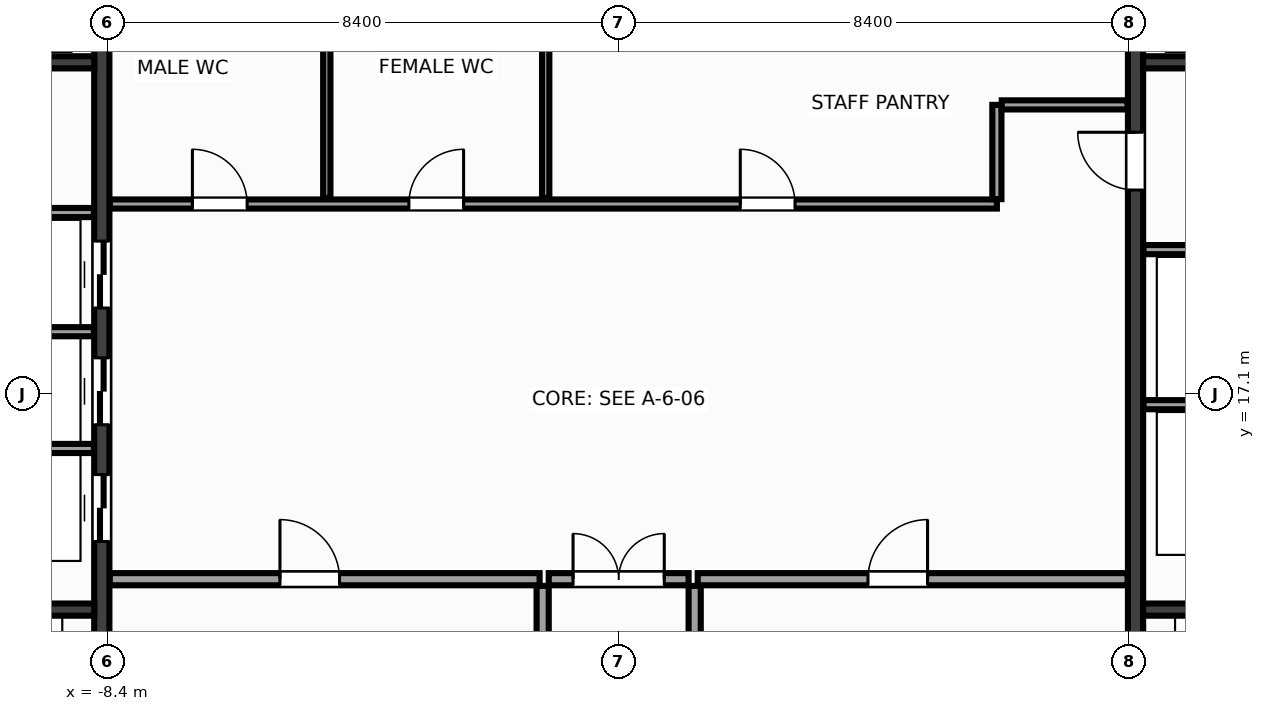
"""IFC4 building model, lengths in metres.
Left out: names, types, materials, properties, quantities, classifications, styles, units other than length and angle.
Written with IfcOpenShell. Run it as: python <this file> out.ifc"""

import sys

from ifc_helpers import new_model, si_unit, direction, frame, frame_2d, origin, place, context, subcontext, project, spatial, rectangle, extrude, source, transform, mapped, element, fill, save


model = new_model("IFC4")
c1 = context("Model", 3, precision=1e-05, world=origin(), true_north=direction((0.0, 1.0)))
c2 = subcontext(c1, "Body", "Model", "MODEL_VIEW")
j1 = project(units=[si_unit("LENGTHUNIT", "METRE"), si_unit("PLANEANGLEUNIT", "RADIAN")], contexts=[c1])
p1 = place(None, origin())
s1 = spatial("IfcSite", under=j1, at=p1, CompositionType="ELEMENT")
p2 = place(p1, origin())
s2 = spatial("IfcBuilding", under=s1, at=p2, CompositionType="ELEMENT")
p3 = place(p2, frame((0.0, 0.0, 228.8)))
s3 = spatial("IfcBuildingStorey", under=s2, at=p3, CompositionType="ELEMENT", Elevation=228.8)
m1 = source(origin(), c2, "Body", "SweptSolid", [
    extrude(rectangle(XDim=13.1, YDim=0.25, at=frame_2d((6.55, 0.0))), origin(), (0.0, 0.0, 1.0), 3.6),
])
p4 = place(p3, frame((-8.5, 10.45, 0.0), z_axis=(0.0, 0.0, 1.0), x_axis=(0.0, 1.0, 0.0)))
e1 = element("IfcWall", 1, at=p4, inside=s3, PredefinedType="SHEAR", context=c2, shape_type="MappedRepresentation", body=[
    mapped(m1, transform((0.0, 0.0, 0.0), x_axis=(1.0, 0.0, 0.0), y_axis=(0.0, 1.0, 0.0), z_axis=(0.0, 0.0, 1.0), scale=1.0)),
])
p5 = place(p4, frame((4.22, 0.0, 0.0)))
e2 = element("IfcOpeningElement", 2, at=p5, cuts=e1, PredefinedType="OPENING", context=c2, shape_type="SweptSolid", body=[
    extrude(rectangle(XDim=1.1, YDim=2.15, at=frame_2d((0.55, 1.075))), frame((0.0, 0.137, 0.0), z_axis=(0.0, -1.0, 0.0), x_axis=(1.0, 0.0, 0.0)), (0.0, 0.0, 1.0), 0.274),
])
p6 = place(p4, frame((6.14, 0.0, 0.0)))
e3 = element("IfcOpeningElement", 3, at=p6, cuts=e1, PredefinedType="OPENING", context=c2, shape_type="SweptSolid", body=[
    extrude(rectangle(XDim=1.1, YDim=2.15, at=frame_2d((0.55, 1.075))), frame((0.0, 0.137, 0.0), z_axis=(0.0, -1.0, 0.0), x_axis=(1.0, 0.0, 0.0)), (0.0, 0.0, 1.0), 0.274),
])
p7 = place(p4, frame((8.06, 0.0, 0.0)))
e4 = element("IfcOpeningElement", 4, at=p7, cuts=e1, PredefinedType="OPENING", context=c2, shape_type="SweptSolid", body=[
    extrude(rectangle(XDim=1.1, YDim=2.15, at=frame_2d((0.55, 1.075))), frame((0.0, 0.137, 0.0), z_axis=(0.0, -1.0, 0.0), x_axis=(1.0, 0.0, 0.0)), (0.0, 0.0, 1.0), 0.274),
])
p8 = place(p3, frame((8.5, 10.45, 0.0), z_axis=(0.0, 0.0, 1.0), x_axis=(0.0, 1.0, 0.0)))
e5 = element("IfcWall", 5, at=p8, inside=s3, PredefinedType="SHEAR", context=c2, shape_type="MappedRepresentation", body=[
    mapped(m1, transform((0.0, 0.0, 0.0), x_axis=(1.0, 0.0, 0.0), y_axis=(0.0, 1.0, 0.0), z_axis=(0.0, 0.0, 1.0), scale=1.0)),
])
p9 = place(p8, frame((10.0, 0.0, 0.0)))
e6 = element("IfcOpeningElement", 6, at=p9, cuts=e5, PredefinedType="OPENING", context=c2, shape_type="SweptSolid", body=[
    extrude(rectangle(XDim=0.95, YDim=2.15, at=frame_2d((0.475, 1.075))), frame((0.0, 0.137, 0.0), z_axis=(0.0, -1.0, 0.0), x_axis=(1.0, 0.0, 0.0)), (0.0, 0.0, 1.0), 0.274),
])
m2 = source(origin(), c2, "Body", "SweptSolid", [
    extrude(rectangle(XDim=2.825, YDim=0.2, at=frame_2d((1.413, 0.0))), origin(), (0.0, 0.0, 1.0), 3.6),
])
for number, where, z_axis, x_axis in (
    (7, (-11.45, 13.55, 0.0), (0.0, 0.0, 1.0), (1.0, 0.0, 0.0)),
    (8, (8.625, 13.55, 0.0), (0.0, 0.0, 1.0), (1.0, 0.0, 0.0)),
):
    element("IfcWall", number, at=place(p3, frame(where, z_axis=z_axis, x_axis=x_axis)), inside=s3, PredefinedType="SHEAR", context=c2, shape_type="MappedRepresentation", body=[
        mapped(m2, transform((0.0, 0.0, 0.0), x_axis=(1.0, 0.0, 0.0), y_axis=(0.0, 1.0, 0.0), z_axis=(0.0, 0.0, 1.0), scale=1.0)),
    ])
m3 = source(origin(), c2, "Body", "SweptSolid", [
    extrude(rectangle(XDim=3.02, YDim=0.2, at=frame_2d((1.51, 0.0))), origin(), (0.0, 0.0, 1.0), 3.6),
])
for number, where, z_axis, x_axis in (
    (9, (-11.645, 22.55, 0.0), (0.0, 0.0, 1.0), (1.0, 0.0, 0.0)),
    (10, (8.625, 22.55, 0.0), (0.0, 0.0, 1.0), (1.0, 0.0, 0.0)),
):
    element("IfcWall", number, at=place(p3, frame(where, z_axis=z_axis, x_axis=x_axis)), inside=s3, PredefinedType="SHEAR", context=c2, shape_type="MappedRepresentation", body=[
        mapped(m3, transform((0.0, 0.0, 0.0), x_axis=(1.0, 0.0, 0.0), y_axis=(0.0, 1.0, 0.0), z_axis=(0.0, 0.0, 1.0), scale=1.0)),
    ])
m4 = source(origin(), c2, "Body", "SweptSolid", [
    extrude(rectangle(XDim=3.01, YDim=0.15, at=frame_2d((1.505, 0.0))), origin(), (0.0, 0.0, 1.0), 3.37),
])
for number, where, z_axis, x_axis in (
    (11, (-11.64, 16.2, 0.0), (0.0, 0.0, 1.0), (1.0, 0.0, 0.0)),
    (12, (-11.64, 18.12, 0.0), (0.0, 0.0, 1.0), (1.0, 0.0, 0.0)),
    (13, (-11.64, 20.08, 0.0), (0.0, 0.0, 1.0), (1.0, 0.0, 0.0)),
    (14, (8.63, 16.92, 0.0), (0.0, 0.0, 1.0), (1.0, 0.0, 0.0)),
    (15, (8.63, 19.47, 0.0), (0.0, 0.0, 1.0), (1.0, 0.0, 0.0)),
):
    element("IfcWall", number, at=place(p3, frame(where, z_axis=z_axis, x_axis=x_axis)), inside=s3, PredefinedType="PARTITIONING", context=c2, shape_type="MappedRepresentation", body=[
        mapped(m4, transform((0.0, 0.0, 0.0), x_axis=(1.0, 0.0, 0.0), y_axis=(0.0, 1.0, 0.0), z_axis=(0.0, 0.0, 1.0), scale=1.0)),
    ])
m5 = source(origin(), c2, "Body", "SweptSolid", [
    extrude(rectangle(XDim=7.07, YDim=0.2, at=frame_2d((3.535, 0.0))), origin(), (0.0, 0.0, 1.0), 3.37),
])
p10 = place(p3, frame((-8.37, 14.05, 0.0), z_axis=(0.0, 0.0, 1.0), x_axis=(1.0, 0.0, 0.0)))
e16 = element("IfcWall", 16, at=p10, inside=s3, PredefinedType="PARTITIONING", context=c2, shape_type="MappedRepresentation", body=[
    mapped(m5, transform((0.0, 0.0, 0.0), x_axis=(1.0, 0.0, 0.0), y_axis=(0.0, 1.0, 0.0), z_axis=(0.0, 0.0, 1.0), scale=1.0)),
])
p11 = place(p10, frame((2.8, 0.0, 0.0)))
e17 = element("IfcOpeningElement", 17, at=p11, cuts=e16, PredefinedType="OPENING", context=c2, shape_type="SweptSolid", body=[
    extrude(rectangle(XDim=0.98, YDim=2.15, at=frame_2d((0.49, 1.075))), frame((0.0, 0.112, 0.0), z_axis=(0.0, -1.0, 0.0), x_axis=(1.0, 0.0, 0.0)), (0.0, 0.0, 1.0), 0.224),
])
p12 = place(p3, frame((1.3, 14.05, 0.0), z_axis=(0.0, 0.0, 1.0), x_axis=(1.0, 0.0, 0.0)))
e18 = element("IfcWall", 18, at=p12, inside=s3, PredefinedType="PARTITIONING", context=c2, shape_type="MappedRepresentation", body=[
    mapped(m5, transform((0.0, 0.0, 0.0), x_axis=(1.0, 0.0, 0.0), y_axis=(0.0, 1.0, 0.0), z_axis=(0.0, 0.0, 1.0), scale=1.0)),
])
p13 = place(p12, frame((2.8, 0.0, 0.0)))
e19 = element("IfcOpeningElement", 19, at=p13, cuts=e18, PredefinedType="OPENING", context=c2, shape_type="SweptSolid", body=[
    extrude(rectangle(XDim=0.98, YDim=2.15, at=frame_2d((0.49, 1.075))), frame((0.0, 0.112, 0.0), z_axis=(0.0, -1.0, 0.0), x_axis=(1.0, 0.0, 0.0)), (0.0, 0.0, 1.0), 0.224),
])
m6 = source(origin(), c2, "Body", "SweptSolid", [
    extrude(rectangle(XDim=3.49, YDim=0.2, at=frame_2d((1.745, 0.0))), origin(), (0.0, 0.0, 1.0), 3.37),
])
for number, where, z_axis, x_axis in (
    (20, (-1.25, 10.45, 0.0), (0.0, 0.0, 1.0), (0.0, 1.0, 0.0)),
    (21, (1.25, 10.45, 0.0), (0.0, 0.0, 1.0), (0.0, 1.0, 0.0)),
):
    element("IfcWall", number, at=place(p3, frame(where, z_axis=z_axis, x_axis=x_axis)), inside=s3, PredefinedType="PARTITIONING", context=c2, shape_type="MappedRepresentation", body=[
        mapped(m6, transform((0.0, 0.0, 0.0), x_axis=(1.0, 0.0, 0.0), y_axis=(0.0, 1.0, 0.0), z_axis=(0.0, 0.0, 1.0), scale=1.0)),
    ])
m7 = source(origin(), c2, "Body", "SweptSolid", [
    extrude(rectangle(XDim=2.3, YDim=0.2, at=frame_2d((1.15, 0.0))), origin(), (0.0, 0.0, 1.0), 3.37),
])
p14 = place(p3, frame((-1.15, 14.05, 0.0), z_axis=(0.0, 0.0, 1.0), x_axis=(1.0, 0.0, 0.0)))
e22 = element("IfcWall", 22, at=p14, inside=s3, PredefinedType="PARTITIONING", context=c2, shape_type="MappedRepresentation", body=[
    mapped(m7, transform((0.0, 0.0, 0.0), x_axis=(1.0, 0.0, 0.0), y_axis=(0.0, 1.0, 0.0), z_axis=(0.0, 0.0, 1.0), scale=1.0)),
])
p15 = place(p14, frame((0.4, 0.0, 0.0)))
e23 = element("IfcOpeningElement", 23, at=p15, cuts=e22, PredefinedType="OPENING", context=c2, shape_type="SweptSolid", body=[
    extrude(rectangle(XDim=1.5, YDim=2.2, at=frame_2d((0.75, 1.1))), frame((0.0, 0.112, 0.0), z_axis=(0.0, -1.0, 0.0), x_axis=(1.0, 0.0, 0.0)), (0.0, 0.0, 1.0), 0.224),
])
m8 = source(origin(), c2, "Body", "SweptSolid", [
    extrude(rectangle(XDim=14.59, YDim=0.15, at=frame_2d((7.295, 0.0))), origin(), (0.0, 0.0, 1.0), 3.37),
])
p16 = place(p3, frame((-8.37, 20.22, 0.0), z_axis=(0.0, 0.0, 1.0), x_axis=(1.0, 0.0, 0.0)))
e24 = element("IfcWall", 24, at=p16, inside=s3, PredefinedType="PARTITIONING", context=c2, shape_type="MappedRepresentation", body=[
    mapped(m8, transform((0.0, 0.0, 0.0), x_axis=(1.0, 0.0, 0.0), y_axis=(0.0, 1.0, 0.0), z_axis=(0.0, 0.0, 1.0), scale=1.0)),
])
p17 = place(p16, frame((1.36, 0.0, 0.0)))
e25 = element("IfcOpeningElement", 25, at=p17, cuts=e24, PredefinedType="OPENING", context=c2, shape_type="SweptSolid", body=[
    extrude(rectangle(XDim=0.9, YDim=2.15, at=frame_2d((0.45, 1.075))), frame((0.0, 0.087, 0.0), z_axis=(0.0, -1.0, 0.0), x_axis=(1.0, 0.0, 0.0)), (0.0, 0.0, 1.0), 0.174),
])
p18 = place(p16, frame((4.92, 0.0, 0.0)))
e26 = element("IfcOpeningElement", 26, at=p18, cuts=e24, PredefinedType="OPENING", context=c2, shape_type="SweptSolid", body=[
    extrude(rectangle(XDim=0.9, YDim=2.15, at=frame_2d((0.45, 1.075))), frame((0.0, 0.087, 0.0), z_axis=(0.0, -1.0, 0.0), x_axis=(1.0, 0.0, 0.0)), (0.0, 0.0, 1.0), 0.174),
])
p19 = place(p16, frame((10.37, 0.0, 0.0)))
e27 = element("IfcOpeningElement", 27, at=p19, cuts=e24, PredefinedType="OPENING", context=c2, shape_type="SweptSolid", body=[
    extrude(rectangle(XDim=0.9, YDim=2.15, at=frame_2d((0.45, 1.075))), frame((0.0, 0.087, 0.0), z_axis=(0.0, -1.0, 0.0), x_axis=(1.0, 0.0, 0.0)), (0.0, 0.0, 1.0), 0.174),
])
m9 = source(origin(), c2, "Body", "SweptSolid", [
    extrude(rectangle(XDim=1.55, YDim=0.15, at=frame_2d((0.775, 0.0))), origin(), (0.0, 0.0, 1.0), 3.37),
])
p20 = place(p3, frame((6.22, 20.3, 0.0), z_axis=(0.0, 0.0, 1.0), x_axis=(0.0, 1.0, 0.0)))
e28 = element("IfcWall", 28, at=p20, inside=s3, PredefinedType="PARTITIONING", context=c2, shape_type="MappedRepresentation", body=[
    mapped(m9, transform((0.0, 0.0, 0.0), x_axis=(1.0, 0.0, 0.0), y_axis=(0.0, 1.0, 0.0), z_axis=(0.0, 0.0, 1.0), scale=1.0)),
])
m10 = source(origin(), c2, "Body", "SweptSolid", [
    extrude(rectangle(XDim=2.07, YDim=0.15, at=frame_2d((1.035, 0.0))), origin(), (0.0, 0.0, 1.0), 3.37),
])
p21 = place(p3, frame((6.3, 21.85, 0.0), z_axis=(0.0, 0.0, 1.0), x_axis=(1.0, 0.0, 0.0)))
e29 = element("IfcWall", 29, at=p21, inside=s3, PredefinedType="PARTITIONING", context=c2, shape_type="MappedRepresentation", body=[
    mapped(m10, transform((0.0, 0.0, 0.0), x_axis=(1.0, 0.0, 0.0), y_axis=(0.0, 1.0, 0.0), z_axis=(0.0, 0.0, 1.0), scale=1.0)),
])
m11 = source(origin(), c2, "Body", "SweptSolid", [
    extrude(rectangle(XDim=3.19, YDim=0.12, at=frame_2d((1.595, 0.0))), origin(), (0.0, 0.0, 1.0), 3.37),
])
for number, where, z_axis, x_axis in (
    (30, (-4.8, 20.32, 0.0), (0.0, 0.0, 1.0), (0.0, 1.0, 0.0)),
    (31, (-1.2, 20.32, 0.0), (0.0, 0.0, 1.0), (0.0, 1.0, 0.0)),
):
    element("IfcWall", number, at=place(p3, frame(where, z_axis=z_axis, x_axis=x_axis)), inside=s3, PredefinedType="PARTITIONING", context=c2, shape_type="MappedRepresentation", body=[
        mapped(m11, transform((0.0, 0.0, 0.0), x_axis=(1.0, 0.0, 0.0), y_axis=(0.0, 1.0, 0.0), z_axis=(0.0, 0.0, 1.0), scale=1.0)),
    ])
m12 = source(origin(), c2, "Body", "SweptSolid", [
    extrude(rectangle(XDim=1.1, YDim=2.15, at=frame_2d((0.55, 1.075))), frame((0.0, 0.025, 0.0), z_axis=(0.0, -1.0, 0.0), x_axis=(1.0, 0.0, 0.0)), (0.0, 0.0, 1.0), 0.05),
])
p22 = place(p5, origin())
e32 = element("IfcDoor", 32, at=p22, inside=s3, OperationType="DOUBLE_DOOR_SLIDING", PredefinedType="DOOR", context=c2, shape_type="MappedRepresentation", body=[
    mapped(m12, transform((0.0, 0.0, 0.0), x_axis=(1.0, 0.0, 0.0), y_axis=(0.0, 1.0, 0.0), z_axis=(0.0, 0.0, 1.0), scale=1.0)),
])
fill(e2, e32)
p23 = place(p6, origin())
e33 = element("IfcDoor", 33, at=p23, inside=s3, OperationType="DOUBLE_DOOR_SLIDING", PredefinedType="DOOR", context=c2, shape_type="MappedRepresentation", body=[
    mapped(m12, transform((0.0, 0.0, 0.0), x_axis=(1.0, 0.0, 0.0), y_axis=(0.0, 1.0, 0.0), z_axis=(0.0, 0.0, 1.0), scale=1.0)),
])
fill(e3, e33)
p24 = place(p7, origin())
e34 = element("IfcDoor", 34, at=p24, inside=s3, OperationType="DOUBLE_DOOR_SLIDING", PredefinedType="DOOR", context=c2, shape_type="MappedRepresentation", body=[
    mapped(m12, transform((0.0, 0.0, 0.0), x_axis=(1.0, 0.0, 0.0), y_axis=(0.0, 1.0, 0.0), z_axis=(0.0, 0.0, 1.0), scale=1.0)),
])
fill(e4, e34)
m13 = source(origin(), c2, "Body", "SweptSolid", [
    extrude(rectangle(XDim=0.95, YDim=2.15, at=frame_2d((0.475, 1.075))), frame((0.0, 0.025, 0.0), z_axis=(0.0, -1.0, 0.0), x_axis=(1.0, 0.0, 0.0)), (0.0, 0.0, 1.0), 0.05),
])
p25 = place(p9, origin())
e35 = element("IfcDoor", 35, at=p25, inside=s3, OperationType="SINGLE_SWING_RIGHT", PredefinedType="DOOR", context=c2, shape_type="MappedRepresentation", body=[
    mapped(m13, transform((0.0, 0.0, 0.0), x_axis=(1.0, 0.0, 0.0), y_axis=(0.0, 1.0, 0.0), z_axis=(0.0, 0.0, 1.0), scale=1.0)),
])
fill(e6, e35)
m14 = source(origin(), c2, "Body", "SweptSolid", [
    extrude(rectangle(XDim=0.98, YDim=2.15, at=frame_2d((0.49, 1.075))), frame((0.0, 0.025, 0.0), z_axis=(0.0, -1.0, 0.0), x_axis=(1.0, 0.0, 0.0)), (0.0, 0.0, 1.0), 0.05),
])
p26 = place(p11, origin())
e36 = element("IfcDoor", 36, at=p26, inside=s3, OperationType="SINGLE_SWING_LEFT", PredefinedType="DOOR", context=c2, shape_type="MappedRepresentation", body=[
    mapped(m14, transform((0.0, 0.0, 0.0), x_axis=(1.0, 0.0, 0.0), y_axis=(0.0, 1.0, 0.0), z_axis=(0.0, 0.0, 1.0), scale=1.0)),
])
fill(e17, e36)
p27 = place(p13, origin())
e37 = element("IfcDoor", 37, at=p27, inside=s3, OperationType="SINGLE_SWING_RIGHT", PredefinedType="DOOR", context=c2, shape_type="MappedRepresentation", body=[
    mapped(m14, transform((0.0, 0.0, 0.0), x_axis=(1.0, 0.0, 0.0), y_axis=(0.0, 1.0, 0.0), z_axis=(0.0, 0.0, 1.0), scale=1.0)),
])
fill(e19, e37)
m15 = source(origin(), c2, "Body", "SweptSolid", [
    extrude(rectangle(XDim=1.5, YDim=2.2, at=frame_2d((0.75, 1.1))), frame((0.0, 0.025, 0.0), z_axis=(0.0, -1.0, 0.0), x_axis=(1.0, 0.0, 0.0)), (0.0, 0.0, 1.0), 0.05),
])
p28 = place(p15, origin())
e38 = element("IfcDoor", 38, at=p28, inside=s3, OperationType="DOUBLE_DOOR_SINGLE_SWING", PredefinedType="DOOR", context=c2, shape_type="MappedRepresentation", body=[
    mapped(m15, transform((0.0, 0.0, 0.0), x_axis=(1.0, 0.0, 0.0), y_axis=(0.0, 1.0, 0.0), z_axis=(0.0, 0.0, 1.0), scale=1.0)),
])
fill(e23, e38)
m16 = source(origin(), c2, "Body", "SweptSolid", [
    extrude(rectangle(XDim=0.9, YDim=2.15, at=frame_2d((0.45, 1.075))), frame((0.0, 0.025, 0.0), z_axis=(0.0, -1.0, 0.0), x_axis=(1.0, 0.0, 0.0)), (0.0, 0.0, 1.0), 0.05),
])
p29 = place(p17, origin())
e39 = element("IfcDoor", 39, at=p29, inside=s3, OperationType="SINGLE_SWING_LEFT", PredefinedType="DOOR", context=c2, shape_type="MappedRepresentation", body=[
    mapped(m16, transform((0.0, 0.0, 0.0), x_axis=(1.0, 0.0, 0.0), y_axis=(0.0, 1.0, 0.0), z_axis=(0.0, 0.0, 1.0), scale=1.0)),
])
fill(e25, e39)
p30 = place(p18, origin())
e40 = element("IfcDoor", 40, at=p30, inside=s3, OperationType="SINGLE_SWING_RIGHT", PredefinedType="DOOR", context=c2, shape_type="MappedRepresentation", body=[
    mapped(m16, transform((0.0, 0.0, 0.0), x_axis=(1.0, 0.0, 0.0), y_axis=(0.0, 1.0, 0.0), z_axis=(0.0, 0.0, 1.0), scale=1.0)),
])
fill(e26, e40)
p31 = place(p19, origin())
e41 = element("IfcDoor", 41, at=p31, inside=s3, OperationType="SINGLE_SWING_LEFT", PredefinedType="DOOR", context=c2, shape_type="MappedRepresentation", body=[
    mapped(m16, transform((0.0, 0.0, 0.0), x_axis=(1.0, 0.0, 0.0), y_axis=(0.0, 1.0, 0.0), z_axis=(0.0, 0.0, 1.0), scale=1.0)),
])
fill(e27, e41)
save(model, sys.argv[1])
